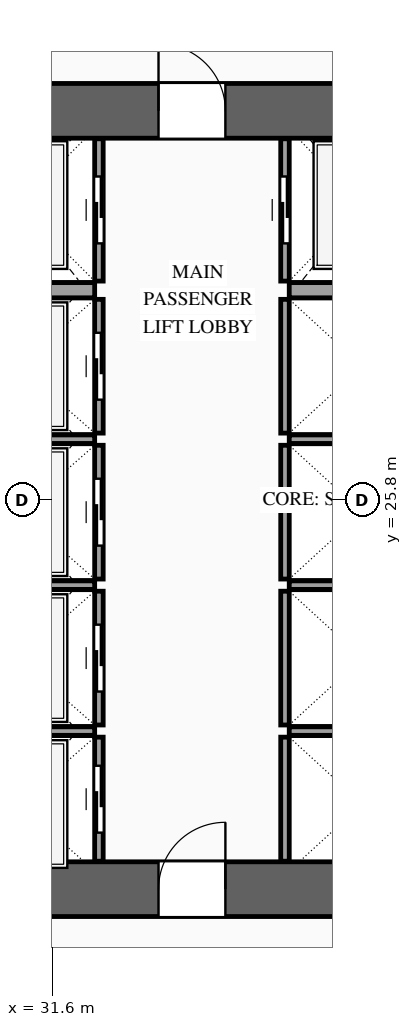
"""IFC4 building model, lengths in metres.
Left out: names, types, materials, properties, quantities, classifications, styles, units other than length and angle.
Written with IfcOpenShell. Run it as: python <this file> out.ifc"""

import sys

from ifc_helpers import new_model, si_unit, direction, frame, frame_2d, origin, place, context, subcontext, project, spatial, rectangle, extrude, source, transform, mapped, element, fill, save


model = new_model("IFC4")
c1 = context("Model", 3, precision=1e-05, world=origin(), true_north=direction((0.0, 1.0)))
c2 = subcontext(c1, "Body", "Model", "MODEL_VIEW")
j1 = project(units=[si_unit("LENGTHUNIT", "METRE"), si_unit("PLANEANGLEUNIT", "RADIAN")], contexts=[c1])
p1 = place(None, origin())
s1 = spatial("IfcSite", under=j1, at=p1, CompositionType="ELEMENT")
p2 = place(p1, origin())
s2 = spatial("IfcBuilding", under=s1, at=p2, CompositionType="ELEMENT")
p3 = place(p2, frame((0.0, 0.0, 71.2)))
s3 = spatial("IfcBuildingStorey", under=s2, at=p3, CompositionType="ELEMENT", Elevation=71.2)
p4 = place(p3, frame((23.35, 19.4, 0.0), z_axis=(0.0, 0.0, 1.0), x_axis=(1.0, 0.0, 0.0)))
e1 = element("IfcWall", 1, at=p4, inside=s3, PredefinedType="SHEAR", context=c2, shape_type="SweptSolid", body=[
    extrude(rectangle(XDim=27.3, YDim=0.9, at=frame_2d((13.65, 0.0))), origin(), (0.0, 0.0, 1.0), 3.6),
])
p5 = place(p4, frame((2.1, 0.0, 0.0)))
e2 = element("IfcOpeningElement", 2, at=p5, cuts=e1, PredefinedType="OPENING", context=c2, shape_type="SweptSolid", body=[
    extrude(rectangle(XDim=1.1, YDim=2.2, at=frame_2d((0.55, 1.1))), frame((0.0, 0.465, 0.0), z_axis=(0.0, -1.0, 0.0), x_axis=(1.0, 0.0, 0.0)), (0.0, 0.0, 1.0), 0.93),
])
p6 = place(p4, frame((10.0, 0.0, 0.0)))
e3 = element("IfcOpeningElement", 3, at=p6, cuts=e1, PredefinedType="OPENING", context=c2, shape_type="SweptSolid", body=[
    extrude(rectangle(XDim=1.1, YDim=2.2, at=frame_2d((0.55, 1.1))), frame((0.0, 0.465, 0.0), z_axis=(0.0, -1.0, 0.0), x_axis=(1.0, 0.0, 0.0)), (0.0, 0.0, 1.0), 0.93),
])
p7 = place(p4, frame((23.2, 0.0, 0.0)))
e4 = element("IfcOpeningElement", 4, at=p7, cuts=e1, PredefinedType="OPENING", context=c2, shape_type="SweptSolid", body=[
    extrude(rectangle(XDim=1.1, YDim=2.2, at=frame_2d((0.55, 1.1))), frame((0.0, 0.465, 0.0), z_axis=(0.0, -1.0, 0.0), x_axis=(1.0, 0.0, 0.0)), (0.0, 0.0, 1.0), 0.93),
])
p8 = place(p4, frame((19.82, 0.0, 0.0)))
e5 = element("IfcOpeningElement", 5, at=p8, cuts=e1, PredefinedType="OPENING", context=c2, shape_type="SweptSolid", body=[
    extrude(rectangle(XDim=0.9, YDim=2.15, at=frame_2d((0.45, 1.075))), frame((0.0, 0.465, 0.0), z_axis=(0.0, -1.0, 0.0), x_axis=(1.0, 0.0, 0.0)), (0.0, 0.0, 1.0), 0.93),
])
p9 = place(p4, frame((18.38, 0.0, 0.0)))
e6 = element("IfcOpeningElement", 6, at=p9, cuts=e1, PredefinedType="OPENING", context=c2, shape_type="SweptSolid", body=[
    extrude(rectangle(XDim=0.9, YDim=2.15, at=frame_2d((0.45, 1.075))), frame((0.0, 0.465, 0.0), z_axis=(0.0, -1.0, 0.0), x_axis=(1.0, 0.0, 0.0)), (0.0, 0.0, 1.0), 0.93),
])
p10 = place(p3, frame((23.35, 32.2, 0.0), z_axis=(0.0, 0.0, 1.0), x_axis=(1.0, 0.0, 0.0)))
e7 = element("IfcWall", 7, at=p10, inside=s3, PredefinedType="SHEAR", context=c2, shape_type="SweptSolid", body=[
    extrude(rectangle(XDim=27.3, YDim=0.9, at=frame_2d((13.65, 0.0))), origin(), (0.0, 0.0, 1.0), 3.6),
])
p11 = place(p10, frame((4.72, 0.0, 0.0)))
e8 = element("IfcOpeningElement", 8, at=p11, cuts=e7, PredefinedType="OPENING", context=c2, shape_type="SweptSolid", body=[
    extrude(rectangle(XDim=0.9, YDim=2.15, at=frame_2d((0.45, 1.075))), frame((0.0, 0.465, 0.0), z_axis=(0.0, -1.0, 0.0), x_axis=(1.0, 0.0, 0.0)), (0.0, 0.0, 1.0), 0.93),
])
p12 = place(p10, frame((10.0, 0.0, 0.0)))
e9 = element("IfcOpeningElement", 9, at=p12, cuts=e7, PredefinedType="OPENING", context=c2, shape_type="SweptSolid", body=[
    extrude(rectangle(XDim=1.1, YDim=2.2, at=frame_2d((0.55, 1.1))), frame((0.0, 0.465, 0.0), z_axis=(0.0, -1.0, 0.0), x_axis=(1.0, 0.0, 0.0)), (0.0, 0.0, 1.0), 0.93),
])
p13 = place(p10, frame((15.85, 0.0, 0.0)))
e10 = element("IfcOpeningElement", 10, at=p13, cuts=e7, PredefinedType="OPENING", context=c2, shape_type="SweptSolid", body=[
    extrude(rectangle(XDim=1.1, YDim=2.2, at=frame_2d((0.55, 1.1))), frame((0.0, 0.465, 0.0), z_axis=(0.0, -1.0, 0.0), x_axis=(1.0, 0.0, 0.0)), (0.0, 0.0, 1.0), 0.93),
])
p14 = place(p10, frame((18.38, 0.0, 0.0)))
e11 = element("IfcOpeningElement", 11, at=p14, cuts=e7, PredefinedType="OPENING", context=c2, shape_type="SweptSolid", body=[
    extrude(rectangle(XDim=0.9, YDim=2.15, at=frame_2d((0.45, 1.075))), frame((0.0, 0.465, 0.0), z_axis=(0.0, -1.0, 0.0), x_axis=(1.0, 0.0, 0.0)), (0.0, 0.0, 1.0), 0.93),
])
p15 = place(p10, frame((19.82, 0.0, 0.0)))
e12 = element("IfcOpeningElement", 12, at=p15, cuts=e7, PredefinedType="OPENING", context=c2, shape_type="SweptSolid", body=[
    extrude(rectangle(XDim=0.9, YDim=2.15, at=frame_2d((0.45, 1.075))), frame((0.0, 0.465, 0.0), z_axis=(0.0, -1.0, 0.0), x_axis=(1.0, 0.0, 0.0)), (0.0, 0.0, 1.0), 0.93),
])
p16 = place(p3, frame((32.37, 19.86, 0.0), z_axis=(0.0, 0.0, 1.0), x_axis=(0.0, 1.0, 0.0)))
e13 = element("IfcWall", 13, at=p16, inside=s3, PredefinedType="SOLIDWALL", context=c2, shape_type="SweptSolid", body=[
    extrude(rectangle(XDim=2.04, YDim=0.14, at=frame_2d((1.02, 0.0))), origin(), (0.0, 0.0, 1.0), 3.38),
])
p17 = place(p16, frame((0.47, 0.0, 0.0)))
e14 = element("IfcOpeningElement", 14, at=p17, cuts=e13, PredefinedType="OPENING", context=c2, shape_type="SweptSolid", body=[
    extrude(rectangle(XDim=1.1, YDim=2.2, at=frame_2d((0.55, 1.1))), frame((0.0, 0.085, 0.0), z_axis=(0.0, -1.0, 0.0), x_axis=(1.0, 0.0, 0.0)), (0.0, 0.0, 1.0), 0.17),
])
m1 = source(origin(), c2, "Body", "SweptSolid", [
    extrude(rectangle(XDim=2.5, YDim=0.14, at=frame_2d((1.25, 0.0))), origin(), (0.0, 0.0, 1.0), 3.38),
])
p18 = place(p3, frame((29.8, 22.0, 0.0), z_axis=(0.0, 0.0, 1.0), x_axis=(1.0, 0.0, 0.0)))
e15 = element("IfcWall", 15, at=p18, inside=s3, PredefinedType="SOLIDWALL", context=c2, shape_type="MappedRepresentation", body=[
    mapped(m1, transform((0.0, 0.0, 0.0), scale=1.0)),
])
p19 = place(p3, frame((32.37, 22.1, 0.0), z_axis=(0.0, 0.0, 1.0), x_axis=(0.0, 1.0, 0.0)))
e16 = element("IfcWall", 16, at=p19, inside=s3, PredefinedType="SOLIDWALL", context=c2, shape_type="SweptSolid", body=[
    extrude(rectangle(XDim=2.2, YDim=0.14, at=frame_2d((1.1, 0.0))), origin(), (0.0, 0.0, 1.0), 3.38),
])
p20 = place(p19, frame((0.55, 0.0, 0.0)))
e17 = element("IfcOpeningElement", 17, at=p20, cuts=e16, PredefinedType="OPENING", context=c2, shape_type="SweptSolid", body=[
    extrude(rectangle(XDim=1.1, YDim=2.2, at=frame_2d((0.55, 1.1))), frame((0.0, 0.085, 0.0), z_axis=(0.0, -1.0, 0.0), x_axis=(1.0, 0.0, 0.0)), (0.0, 0.0, 1.0), 0.17),
])
p21 = place(p3, frame((29.8, 24.4, 0.0), z_axis=(0.0, 0.0, 1.0), x_axis=(1.0, 0.0, 0.0)))
e18 = element("IfcWall", 18, at=p21, inside=s3, PredefinedType="SOLIDWALL", context=c2, shape_type="MappedRepresentation", body=[
    mapped(m1, transform((0.0, 0.0, 0.0), scale=1.0)),
])
p22 = place(p3, frame((32.37, 24.5, 0.0), z_axis=(0.0, 0.0, 1.0), x_axis=(0.0, 1.0, 0.0)))
e19 = element("IfcWall", 19, at=p22, inside=s3, PredefinedType="SOLIDWALL", context=c2, shape_type="SweptSolid", body=[
    extrude(rectangle(XDim=2.2, YDim=0.14, at=frame_2d((1.1, 0.0))), origin(), (0.0, 0.0, 1.0), 3.38),
])
p23 = place(p22, frame((0.55, 0.0, 0.0)))
e20 = element("IfcOpeningElement", 20, at=p23, cuts=e19, PredefinedType="OPENING", context=c2, shape_type="SweptSolid", body=[
    extrude(rectangle(XDim=1.1, YDim=2.2, at=frame_2d((0.55, 1.1))), frame((0.0, 0.085, 0.0), z_axis=(0.0, -1.0, 0.0), x_axis=(1.0, 0.0, 0.0)), (0.0, 0.0, 1.0), 0.17),
])
p24 = place(p3, frame((29.8, 26.8, 0.0), z_axis=(0.0, 0.0, 1.0), x_axis=(1.0, 0.0, 0.0)))
e21 = element("IfcWall", 21, at=p24, inside=s3, PredefinedType="SOLIDWALL", context=c2, shape_type="MappedRepresentation", body=[
    mapped(m1, transform((0.0, 0.0, 0.0), scale=1.0)),
])
p25 = place(p3, frame((32.37, 26.9, 0.0), z_axis=(0.0, 0.0, 1.0), x_axis=(0.0, 1.0, 0.0)))
e22 = element("IfcWall", 22, at=p25, inside=s3, PredefinedType="SOLIDWALL", context=c2, shape_type="SweptSolid", body=[
    extrude(rectangle(XDim=2.2, YDim=0.14, at=frame_2d((1.1, 0.0))), origin(), (0.0, 0.0, 1.0), 3.38),
])
p26 = place(p25, frame((0.55, 0.0, 0.0)))
e23 = element("IfcOpeningElement", 23, at=p26, cuts=e22, PredefinedType="OPENING", context=c2, shape_type="SweptSolid", body=[
    extrude(rectangle(XDim=1.1, YDim=2.2, at=frame_2d((0.55, 1.1))), frame((0.0, 0.085, 0.0), z_axis=(0.0, -1.0, 0.0), x_axis=(1.0, 0.0, 0.0)), (0.0, 0.0, 1.0), 0.17),
])
p27 = place(p3, frame((32.37, 29.4, 0.0), z_axis=(0.0, 0.0, 1.0), x_axis=(0.0, 1.0, 0.0)))
e24 = element("IfcWall", 24, at=p27, inside=s3, PredefinedType="SOLIDWALL", context=c2, shape_type="SweptSolid", body=[
    extrude(rectangle(XDim=2.34, YDim=0.14, at=frame_2d((1.17, 0.0))), origin(), (0.0, 0.0, 1.0), 3.38),
])
p28 = place(p27, frame((0.62, 0.0, 0.0)))
e25 = element("IfcOpeningElement", 25, at=p28, cuts=e24, PredefinedType="OPENING", context=c2, shape_type="SweptSolid", body=[
    extrude(rectangle(XDim=1.1, YDim=2.2, at=frame_2d((0.55, 1.1))), frame((0.0, 0.085, 0.0), z_axis=(0.0, -1.0, 0.0), x_axis=(1.0, 0.0, 0.0)), (0.0, 0.0, 1.0), 0.17),
])
m2 = source(origin(), c2, "Body", "SweptSolid", [
    extrude(rectangle(XDim=2.5, YDim=0.25, at=frame_2d((1.25, 0.0))), origin(), (0.0, 0.0, 1.0), 3.38),
])
p29 = place(p3, frame((29.8, 29.25, 0.0), z_axis=(0.0, 0.0, 1.0), x_axis=(1.0, 0.0, 0.0)))
e26 = element("IfcWall", 26, at=p29, inside=s3, PredefinedType="SOLIDWALL", context=c2, shape_type="MappedRepresentation", body=[
    mapped(m2, transform((0.0, 0.0, 0.0), scale=1.0)),
])
m3 = source(origin(), c2, "Body", "SweptSolid", [
    extrude(rectangle(XDim=2.04, YDim=0.14, at=frame_2d((1.02, 0.0))), origin(), (0.0, 0.0, 1.0), 3.38),
])
p30 = place(p3, frame((35.43, 19.86, 0.0), z_axis=(0.0, 0.0, 1.0), x_axis=(0.0, 1.0, 0.0)))
e27 = element("IfcWall", 27, at=p30, inside=s3, PredefinedType="SOLIDWALL", context=c2, shape_type="MappedRepresentation", body=[
    mapped(m3, transform((0.0, 0.0, 0.0), scale=1.0)),
])
m4 = source(origin(), c2, "Body", "SweptSolid", [
    extrude(rectangle(XDim=2.4, YDim=0.14, at=frame_2d((1.2, 0.0))), origin(), (0.0, 0.0, 1.0), 3.38),
])
p31 = place(p3, frame((35.5, 22.0, 0.0), z_axis=(0.0, 0.0, 1.0), x_axis=(1.0, 0.0, 0.0)))
e28 = element("IfcWall", 28, at=p31, inside=s3, PredefinedType="SOLIDWALL", context=c2, shape_type="MappedRepresentation", body=[
    mapped(m4, transform((0.0, 0.0, 0.0), scale=1.0)),
])
m5 = source(origin(), c2, "Body", "SweptSolid", [
    extrude(rectangle(XDim=2.2, YDim=0.14, at=frame_2d((1.1, 0.0))), origin(), (0.0, 0.0, 1.0), 3.38),
])
p32 = place(p3, frame((35.43, 22.1, 0.0), z_axis=(0.0, 0.0, 1.0), x_axis=(0.0, 1.0, 0.0)))
e29 = element("IfcWall", 29, at=p32, inside=s3, PredefinedType="SOLIDWALL", context=c2, shape_type="MappedRepresentation", body=[
    mapped(m5, transform((0.0, 0.0, 0.0), scale=1.0)),
])
p33 = place(p3, frame((35.5, 24.4, 0.0), z_axis=(0.0, 0.0, 1.0), x_axis=(1.0, 0.0, 0.0)))
e30 = element("IfcWall", 30, at=p33, inside=s3, PredefinedType="SOLIDWALL", context=c2, shape_type="MappedRepresentation", body=[
    mapped(m4, transform((0.0, 0.0, 0.0), scale=1.0)),
])
p34 = place(p3, frame((35.43, 24.5, 0.0), z_axis=(0.0, 0.0, 1.0), x_axis=(0.0, 1.0, 0.0)))
e31 = element("IfcWall", 31, at=p34, inside=s3, PredefinedType="SOLIDWALL", context=c2, shape_type="MappedRepresentation", body=[
    mapped(m5, transform((0.0, 0.0, 0.0), scale=1.0)),
])
p35 = place(p3, frame((35.5, 26.8, 0.0), z_axis=(0.0, 0.0, 1.0), x_axis=(1.0, 0.0, 0.0)))
e32 = element("IfcWall", 32, at=p35, inside=s3, PredefinedType="SOLIDWALL", context=c2, shape_type="MappedRepresentation", body=[
    mapped(m4, transform((0.0, 0.0, 0.0), scale=1.0)),
])
m6 = source(origin(), c2, "Body", "SweptSolid", [
    extrude(rectangle(XDim=2.2, YDim=0.14, at=frame_2d((1.1, 0.0))), origin(), (0.0, 0.0, 1.0), 3.38),
])
p36 = place(p3, frame((35.43, 26.9, 0.0), z_axis=(0.0, 0.0, 1.0), x_axis=(0.0, 1.0, 0.0)))
e33 = element("IfcWall", 33, at=p36, inside=s3, PredefinedType="SOLIDWALL", context=c2, shape_type="MappedRepresentation", body=[
    mapped(m6, transform((0.0, 0.0, 0.0), scale=1.0)),
])
p37 = place(p3, frame((35.43, 29.4, 0.0), z_axis=(0.0, 0.0, 1.0), x_axis=(0.0, 1.0, 0.0)))
e34 = element("IfcWall", 34, at=p37, inside=s3, PredefinedType="SOLIDWALL", context=c2, shape_type="SweptSolid", body=[
    extrude(rectangle(XDim=2.34, YDim=0.14, at=frame_2d((1.17, 0.0))), origin(), (0.0, 0.0, 1.0), 3.38),
])
p38 = place(p37, frame((0.62, 0.0, 0.0)))
e35 = element("IfcOpeningElement", 35, at=p38, cuts=e34, PredefinedType="OPENING", context=c2, shape_type="SweptSolid", body=[
    extrude(rectangle(XDim=1.1, YDim=2.2, at=frame_2d((0.55, 1.1))), frame((0.0, 0.085, 0.0), z_axis=(0.0, -1.0, 0.0), x_axis=(1.0, 0.0, 0.0)), (0.0, 0.0, 1.0), 0.17),
])
m7 = source(origin(), c2, "Body", "SweptSolid", [
    extrude(rectangle(XDim=2.4, YDim=0.25, at=frame_2d((1.2, 0.0))), origin(), (0.0, 0.0, 1.0), 3.38),
])
p39 = place(p3, frame((35.5, 29.25, 0.0), z_axis=(0.0, 0.0, 1.0), x_axis=(1.0, 0.0, 0.0)))
e36 = element("IfcWall", 36, at=p39, inside=s3, PredefinedType="SOLIDWALL", context=c2, shape_type="MappedRepresentation", body=[
    mapped(m7, transform((0.0, 0.0, 0.0), scale=1.0)),
])
m8 = source(origin(), c2, "Body", "SweptSolid", [
    extrude(rectangle(XDim=1.1, YDim=2.2, at=frame_2d((0.55, 1.1))), frame((0.0, 0.025, 0.0), z_axis=(0.0, -1.0, 0.0), x_axis=(1.0, 0.0, 0.0)), (0.0, 0.0, 1.0), 0.05),
])
p40 = place(p17, origin())
e37 = element("IfcDoor", 37, at=p40, inside=s3, OperationType="SLIDING_TO_LEFT", PredefinedType="DOOR", context=c2, shape_type="MappedRepresentation", body=[
    mapped(m8, transform((0.0, 0.0, 0.0), scale=1.0)),
])
fill(e14, e37)
p41 = place(p20, origin())
e38 = element("IfcDoor", 38, at=p41, inside=s3, OperationType="SLIDING_TO_RIGHT", PredefinedType="DOOR", context=c2, shape_type="MappedRepresentation", body=[
    mapped(m8, transform((0.0, 0.0, 0.0), scale=1.0)),
])
fill(e17, e38)
p42 = place(p23, origin())
e39 = element("IfcDoor", 39, at=p42, inside=s3, OperationType="SLIDING_TO_LEFT", PredefinedType="DOOR", context=c2, shape_type="MappedRepresentation", body=[
    mapped(m8, transform((0.0, 0.0, 0.0), scale=1.0)),
])
fill(e20, e39)
p43 = place(p26, origin())
e40 = element("IfcDoor", 40, at=p43, inside=s3, OperationType="SLIDING_TO_RIGHT", PredefinedType="DOOR", context=c2, shape_type="MappedRepresentation", body=[
    mapped(m8, transform((0.0, 0.0, 0.0), scale=1.0)),
])
fill(e23, e40)
p44 = place(p28, origin())
e41 = element("IfcDoor", 41, at=p44, inside=s3, OperationType="SLIDING_TO_LEFT", PredefinedType="DOOR", context=c2, shape_type="MappedRepresentation", body=[
    mapped(m8, transform((0.0, 0.0, 0.0), scale=1.0)),
])
fill(e25, e41)
p45 = place(p38, origin())
e42 = element("IfcDoor", 42, at=p45, inside=s3, OperationType="SLIDING_TO_RIGHT", PredefinedType="DOOR", context=c2, shape_type="MappedRepresentation", body=[
    mapped(m8, transform((0.0, 0.0, 0.0), scale=1.0)),
])
fill(e35, e42)
m9 = source(origin(), c2, "Body", "SweptSolid", [
    extrude(rectangle(XDim=1.1, YDim=2.2, at=frame_2d((0.55, 1.1))), frame((0.0, 0.025, 0.0), z_axis=(0.0, -1.0, 0.0), x_axis=(1.0, 0.0, 0.0)), (0.0, 0.0, 1.0), 0.05),
])
p46 = place(p6, origin())
e43 = element("IfcDoor", 43, at=p46, inside=s3, OperationType="SINGLE_SWING_RIGHT", PredefinedType="DOOR", context=c2, shape_type="MappedRepresentation", body=[
    mapped(m9, transform((0.0, 0.0, 0.0), scale=1.0)),
])
fill(e3, e43)
p47 = place(p12, origin())
e44 = element("IfcDoor", 44, at=p47, inside=s3, OperationType="SINGLE_SWING_LEFT", PredefinedType="DOOR", context=c2, shape_type="MappedRepresentation", body=[
    mapped(m9, transform((0.0, 0.0, 0.0), scale=1.0)),
])
fill(e9, e44)
save(model, sys.argv[1])
